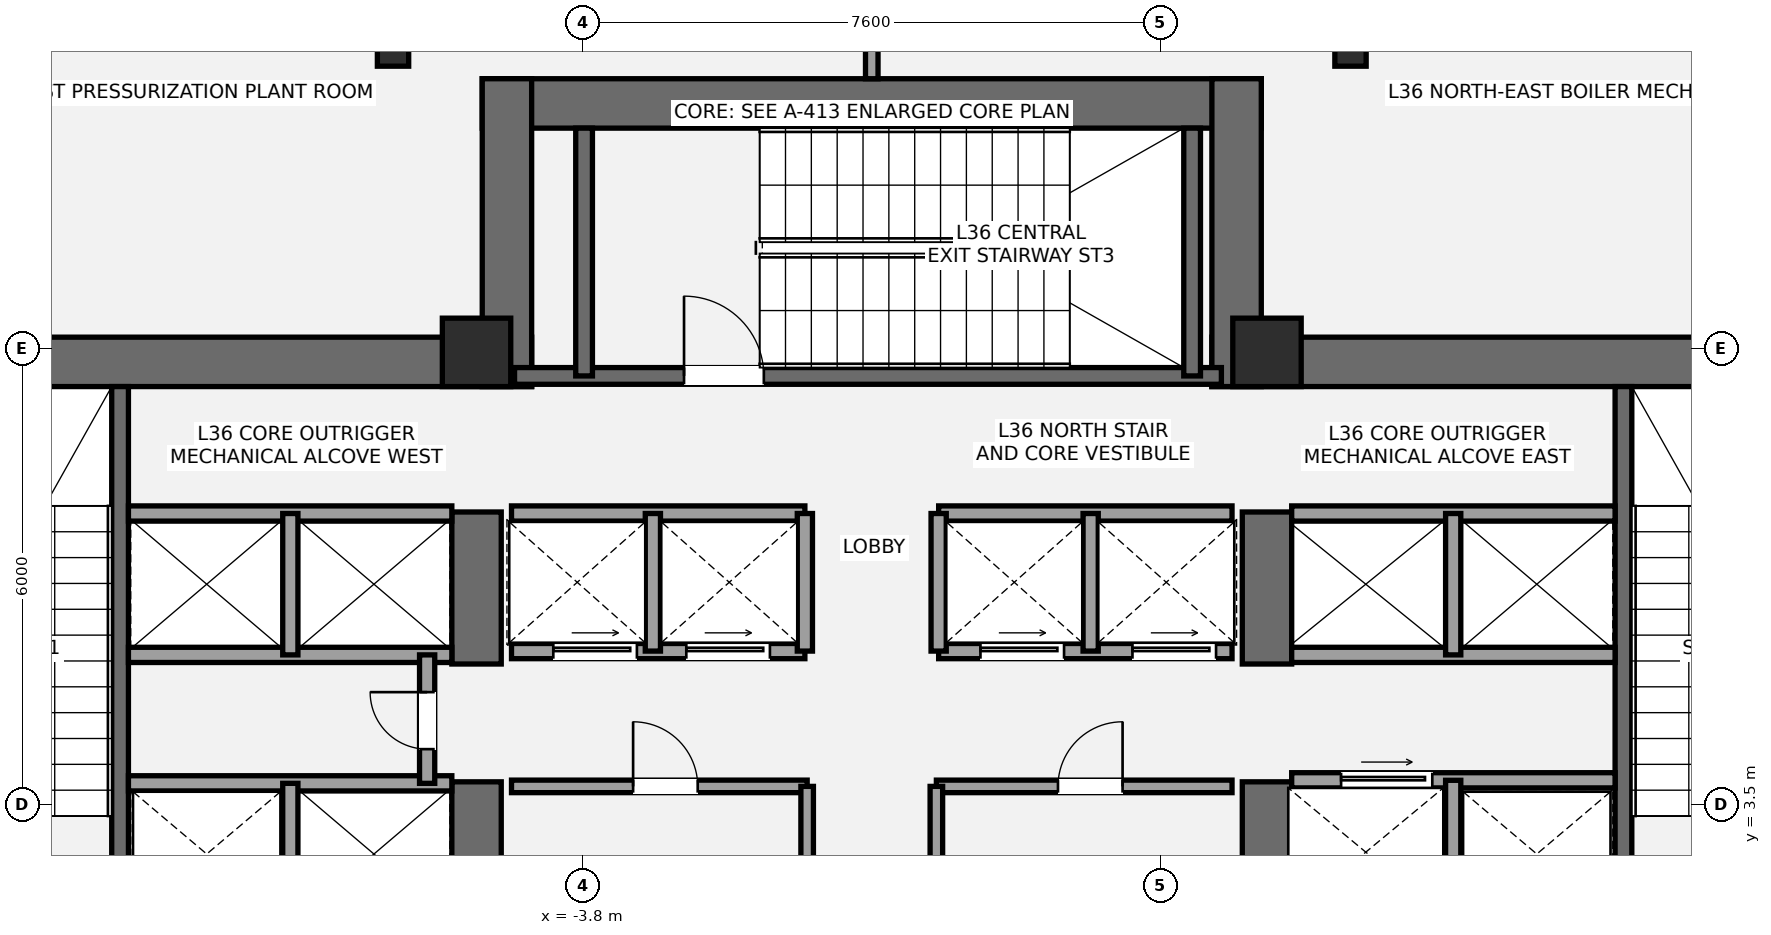
"""IFC4 building model, lengths in metres.
Left out: names, types, materials, properties, quantities, classifications, styles, units other than length and angle.
Written with IfcOpenShell. Run it as: python <this file> out.ifc"""

import sys

from ifc_helpers import new_model, si_unit, direction, frame, frame_2d, origin, origin_2d, place, context, subcontext, project, spatial, rectangle, i_section, extrude, element, fill, save


model = new_model("IFC4")
c1 = context("Model", 3, precision=1e-05, world=origin(), true_north=direction((0.0, 1.0)))
c2 = subcontext(c1, "Body", "Model", "MODEL_VIEW")
j1 = project(units=[si_unit("LENGTHUNIT", "METRE"), si_unit("PLANEANGLEUNIT", "RADIAN")], contexts=[c1])
p1 = place(None, origin())
s1 = spatial("IfcSite", under=j1, at=p1, CompositionType="ELEMENT")
p2 = place(p1, origin())
s2 = spatial("IfcBuilding", under=s1, at=p2, CompositionType="ELEMENT")
p3 = place(p2, frame((0.0, 0.0, 135.1)))
s3 = spatial("IfcBuildingStorey", under=s2, at=p3, CompositionType="ELEMENT", Elevation=135.1)
p4 = place(p3, frame((-13.8, 9.325, 0.0), z_axis=(0.0, 0.0, 1.0), x_axis=(1.0, 0.0, 0.0)))
e1 = element("IfcWall", 1, at=p4, inside=s3, PredefinedType="SHEAR", context=c2, shape_type="SweptSolid", body=[
    extrude(rectangle(XDim=9.325, YDim=0.65, at=frame_2d((4.663, 0.0))), origin(), (0.0, 0.0, 1.0), 4.5),
])
p5 = place(p3, frame((-5.2, 1.2, 0.0), z_axis=(0.0, 0.0, 1.0), x_axis=(0.0, 1.0, 0.0)))
e2 = element("IfcWall", 2, at=p5, inside=s3, PredefinedType="SHEAR", context=c2, shape_type="SweptSolid", body=[
    extrude(rectangle(XDim=2.6, YDim=0.65, at=frame_2d((1.3, 0.0))), origin(), (0.0, 0.0, 1.0), 4.5),
])
p6 = place(p3, frame((-5.2, 5.35, 0.0), z_axis=(0.0, 0.0, 1.0), x_axis=(0.0, 1.0, 0.0)))
e3 = element("IfcWall", 3, at=p6, inside=s3, PredefinedType="SHEAR", context=c2, shape_type="SweptSolid", body=[
    extrude(rectangle(XDim=2.0, YDim=0.65, at=frame_2d((1.0, 0.0))), origin(), (0.0, 0.0, 1.0), 4.5),
])
p7 = place(p3, frame((-9.89, 1.85, 0.0), z_axis=(0.0, 0.0, 1.0), x_axis=(0.0, 1.0, 0.0)))
e4 = element("IfcWall", 4, at=p7, inside=s3, PredefinedType="SHEAR", context=c2, shape_type="SweptSolid", body=[
    extrude(rectangle(XDim=7.15, YDim=0.22, at=frame_2d((3.575, 0.0))), origin(), (0.0, 0.0, 1.0), 4.5),
])
p8 = place(p3, frame((4.475, 9.325, 0.0), z_axis=(0.0, 0.0, 1.0), x_axis=(1.0, 0.0, 0.0)))
e5 = element("IfcWall", 5, at=p8, inside=s3, PredefinedType="SHEAR", context=c2, shape_type="SweptSolid", body=[
    extrude(rectangle(XDim=9.325, YDim=0.65, at=frame_2d((4.663, 0.0))), origin(), (0.0, 0.0, 1.0), 4.5),
])
p9 = place(p3, frame((5.2, 1.2, 0.0), z_axis=(0.0, 0.0, 1.0), x_axis=(0.0, 1.0, 0.0)))
e6 = element("IfcWall", 6, at=p9, inside=s3, PredefinedType="SHEAR", context=c2, shape_type="SweptSolid", body=[
    extrude(rectangle(XDim=2.6, YDim=0.65, at=frame_2d((1.3, 0.0))), origin(), (0.0, 0.0, 1.0), 4.5),
])
p10 = place(p3, frame((5.2, 5.35, 0.0), z_axis=(0.0, 0.0, 1.0), x_axis=(0.0, 1.0, 0.0)))
e7 = element("IfcWall", 7, at=p10, inside=s3, PredefinedType="SHEAR", context=c2, shape_type="SweptSolid", body=[
    extrude(rectangle(XDim=2.0, YDim=0.65, at=frame_2d((1.0, 0.0))), origin(), (0.0, 0.0, 1.0), 4.5),
])
p11 = place(p3, frame((9.89, 1.85, 0.0), z_axis=(0.0, 0.0, 1.0), x_axis=(0.0, 1.0, 0.0)))
e8 = element("IfcWall", 8, at=p11, inside=s3, PredefinedType="SHEAR", context=c2, shape_type="SweptSolid", body=[
    extrude(rectangle(XDim=7.15, YDim=0.22, at=frame_2d((3.575, 0.0))), origin(), (0.0, 0.0, 1.0), 4.5),
])
p12 = place(p3, frame((-5.125, 12.725, 0.0), z_axis=(0.0, 0.0, 1.0), x_axis=(1.0, 0.0, 0.0)))
e9 = element("IfcWall", 9, at=p12, inside=s3, PredefinedType="SHEAR", context=c2, shape_type="SweptSolid", body=[
    extrude(rectangle(XDim=10.25, YDim=0.65, at=frame_2d((5.125, 0.0))), origin(), (0.0, 0.0, 1.0), 4.5),
])
for number, where, z_axis, x_axis in (
    (10, (-4.8, 9.0, 0.0), (0.0, 0.0, 1.0), (0.0, 1.0, 0.0)),
    (11, (4.8, 9.0, 0.0), (0.0, 0.0, 1.0), (0.0, 1.0, 0.0)),
):
    element("IfcWall", number, at=place(p3, frame(where, z_axis=z_axis, x_axis=x_axis)), inside=s3, PredefinedType="SHEAR", context=c2, shape_type="SweptSolid", body=[
        extrude(rectangle(XDim=4.05, YDim=0.65, at=frame_2d((2.025, 0.0))), origin(), (0.0, 0.0, 1.0), 4.5),
    ])
p13 = place(p3, frame((-4.7, 9.14, 0.0), z_axis=(0.0, 0.0, 1.0), x_axis=(1.0, 0.0, 0.0)))
e12 = element("IfcWall", 12, at=p13, inside=s3, PredefinedType="SHEAR", context=c2, shape_type="SweptSolid", body=[
    extrude(rectangle(XDim=9.3, YDim=0.22, at=frame_2d((4.65, 0.0))), origin(), (0.0, 0.0, 1.0), 4.5),
])
p14 = place(p13, frame((2.23, 0.0, 0.0)))
e13 = element("IfcOpeningElement", 13, at=p14, cuts=e12, PredefinedType="OPENING", context=c2, shape_type="SweptSolid", body=[
    extrude(rectangle(XDim=1.05, YDim=2.15, at=frame_2d((0.525, 1.075))), frame((0.0, 0.12, 0.0), z_axis=(0.0, -1.0, 0.0), x_axis=(1.0, 0.0, 0.0)), (0.0, 0.0, 1.0), 0.24),
])
for number, where, z_axis, x_axis in (
    (14, (-3.785, 9.14, 0.0), (0.0, 0.0, 1.0), (0.0, 1.0, 0.0)),
    (15, (4.215, 9.14, 0.0), (0.0, 0.0, 1.0), (0.0, 1.0, 0.0)),
):
    element("IfcWall", number, at=place(p3, frame(where, z_axis=z_axis, x_axis=x_axis)), inside=s3, PredefinedType="SHEAR", context=c2, shape_type="SweptSolid", body=[
        extrude(rectangle(XDim=3.26, YDim=0.22, at=frame_2d((1.63, 0.0))), origin(), (0.0, 0.0, 1.0), 4.5),
    ])
for number, where, z_axis, x_axis in (
    (16, (-5.2, 9.45, 0.0), (0.0, 0.0, 1.0), (1.0, 0.0, 0.0)),
    (17, (5.2, 9.45, 0.0), (0.0, 0.0, 1.0), (1.0, 0.0, 0.0)),
):
    element("IfcColumn", number, at=place(p3, frame(where, z_axis=z_axis, x_axis=x_axis)), inside=s3, PredefinedType="COLUMN", context=c2, shape_type="SweptSolid", body=[
        extrude(rectangle(XDim=0.9, YDim=0.9, at=origin_2d()), origin(), (0.0, 0.0, 1.0), 4.5),
    ])
for number, where, z_axis, x_axis in (
    (18, (6.299, 13.433, 0.0), (0.0, 0.0, 1.0), (1.0, 0.0, 0.0)),
    (19, (-6.299, 13.433, 0.0), (0.0, 0.0, 1.0), (1.0, 0.0, 0.0)),
):
    element("IfcColumn", number, at=place(p3, frame(where, z_axis=z_axis, x_axis=x_axis)), inside=s3, PredefinedType="COLUMN", context=c2, shape_type="SweptSolid", body=[
        extrude(i_section(OverallWidth=0.412, OverallDepth=0.435, WebThickness=0.036, FlangeThickness=0.057, at=origin_2d()), origin(), (0.0, 0.0, 1.0), 4.5),
    ])
p15 = place(p3, frame((-9.78, 3.78, 0.0), z_axis=(0.0, 0.0, 1.0), x_axis=(1.0, 0.0, 0.0)))
e20 = element("IfcWall", 20, at=p15, inside=s3, PredefinedType="SOLIDWALL", context=c2, shape_type="SweptSolid", body=[
    extrude(rectangle(XDim=4.255, YDim=0.2, at=frame_2d((2.127, 0.0))), origin(), (0.0, 0.0, 1.0), 4.28),
])
p16 = place(p3, frame((-7.65, 1.85, 0.0), z_axis=(0.0, 0.0, 1.0), x_axis=(0.0, 1.0, 0.0)))
e21 = element("IfcWall", 21, at=p16, inside=s3, PredefinedType="SOLIDWALL", context=c2, shape_type="SweptSolid", body=[
    extrude(rectangle(XDim=1.93, YDim=0.2, at=frame_2d((0.965, 0.0))), origin(), (0.0, 0.0, 1.0), 4.28),
])
for number, where, z_axis, x_axis in (
    (22, (-9.78, 5.47, 0.0), (0.0, 0.0, 1.0), (1.0, 0.0, 0.0)),
    (23, (-9.78, 7.33, 0.0), (0.0, 0.0, 1.0), (1.0, 0.0, 0.0)),
):
    element("IfcWall", number, at=place(p3, frame(where, z_axis=z_axis, x_axis=x_axis)), inside=s3, PredefinedType="SOLIDWALL", context=c2, shape_type="SweptSolid", body=[
        extrude(rectangle(XDim=4.255, YDim=0.2, at=frame_2d((2.127, 0.0))), origin(), (0.0, 0.0, 1.0), 4.28),
    ])
p17 = place(p3, frame((-7.65, 5.47, 0.0), z_axis=(0.0, 0.0, 1.0), x_axis=(0.0, 1.0, 0.0)))
e24 = element("IfcWall", 24, at=p17, inside=s3, PredefinedType="SOLIDWALL", context=c2, shape_type="SweptSolid", body=[
    extrude(rectangle(XDim=1.86, YDim=0.2, at=frame_2d((0.93, 0.0))), origin(), (0.0, 0.0, 1.0), 4.28),
])
p18 = place(p3, frame((-5.85, 3.78, 0.0), z_axis=(0.0, 0.0, 1.0), x_axis=(0.0, 1.0, 0.0)))
e25 = element("IfcWall", 25, at=p18, inside=s3, PredefinedType="SOLIDWALL", context=c2, shape_type="SweptSolid", body=[
    extrude(rectangle(XDim=1.69, YDim=0.2, at=frame_2d((0.845, 0.0))), origin(), (0.0, 0.0, 1.0), 4.28),
])
p19 = place(p18, frame((0.45, 0.0, 0.0)))
e26 = element("IfcOpeningElement", 26, at=p19, cuts=e25, PredefinedType="OPENING", context=c2, shape_type="SweptSolid", body=[
    extrude(rectangle(XDim=0.75, YDim=2.1, at=frame_2d((0.375, 1.05))), frame((0.0, 0.11, 0.0), z_axis=(0.0, -1.0, 0.0), x_axis=(1.0, 0.0, 0.0)), (0.0, 0.0, 1.0), 0.22),
])
p20 = place(p3, frame((5.525, 3.82, 0.0), z_axis=(0.0, 0.0, 1.0), x_axis=(1.0, 0.0, 0.0)))
e27 = element("IfcWall", 27, at=p20, inside=s3, PredefinedType="SOLIDWALL", context=c2, shape_type="SweptSolid", body=[
    extrude(rectangle(XDim=4.255, YDim=0.2, at=frame_2d((2.127, 0.0))), origin(), (0.0, 0.0, 1.0), 4.28),
])
p21 = place(p20, frame((0.65, 0.0, 0.0)))
e28 = element("IfcOpeningElement", 28, at=p21, cuts=e27, PredefinedType="OPENING", context=c2, shape_type="SweptSolid", body=[
    extrude(rectangle(XDim=1.2, YDim=2.2, at=frame_2d((0.6, 1.1))), frame((0.0, 0.11, 0.0), z_axis=(0.0, -1.0, 0.0), x_axis=(1.0, 0.0, 0.0)), (0.0, 0.0, 1.0), 0.22),
])
p22 = place(p3, frame((7.65, 1.85, 0.0), z_axis=(0.0, 0.0, 1.0), x_axis=(0.0, 1.0, 0.0)))
e29 = element("IfcWall", 29, at=p22, inside=s3, PredefinedType="SOLIDWALL", context=c2, shape_type="SweptSolid", body=[
    extrude(rectangle(XDim=1.97, YDim=0.2, at=frame_2d((0.985, 0.0))), origin(), (0.0, 0.0, 1.0), 4.28),
])
for number, where, z_axis, x_axis in (
    (30, (5.525, 5.47, 0.0), (0.0, 0.0, 1.0), (1.0, 0.0, 0.0)),
    (31, (5.525, 7.33, 0.0), (0.0, 0.0, 1.0), (1.0, 0.0, 0.0)),
):
    element("IfcWall", number, at=place(p3, frame(where, z_axis=z_axis, x_axis=x_axis)), inside=s3, PredefinedType="SOLIDWALL", context=c2, shape_type="SweptSolid", body=[
        extrude(rectangle(XDim=4.255, YDim=0.2, at=frame_2d((2.127, 0.0))), origin(), (0.0, 0.0, 1.0), 4.28),
    ])
p23 = place(p3, frame((7.65, 5.47, 0.0), z_axis=(0.0, 0.0, 1.0), x_axis=(0.0, 1.0, 0.0)))
e32 = element("IfcWall", 32, at=p23, inside=s3, PredefinedType="SOLIDWALL", context=c2, shape_type="SweptSolid", body=[
    extrude(rectangle(XDim=1.86, YDim=0.2, at=frame_2d((0.93, 0.0))), origin(), (0.0, 0.0, 1.0), 4.28),
])
p24 = place(p3, frame((-4.74, 3.74, 0.0), z_axis=(0.0, 0.0, 1.0), x_axis=(1.0, 0.0, 0.0)))
e33 = element("IfcWall", 33, at=p24, inside=s3, PredefinedType="PARTITIONING", context=c2, shape_type="SweptSolid", body=[
    extrude(rectangle(XDim=3.89, YDim=0.165, at=frame_2d((1.945, 0.0))), origin(), (0.0, 0.0, 1.0), 4.28),
])
p25 = place(p24, frame((1.6, 0.0, 0.0)))
e34 = element("IfcOpeningElement", 34, at=p25, cuts=e33, PredefinedType="OPENING", context=c2, shape_type="SweptSolid", body=[
    extrude(rectangle(XDim=0.85, YDim=2.1, at=frame_2d((0.425, 1.05))), frame((0.0, 0.093, 0.0), z_axis=(0.0, -1.0, 0.0), x_axis=(1.0, 0.0, 0.0)), (0.0, 0.0, 1.0), 0.185),
])
p26 = place(p3, frame((-0.85, 1.92, 0.0), z_axis=(0.0, 0.0, 1.0), x_axis=(0.0, 1.0, 0.0)))
e35 = element("IfcWall", 35, at=p26, inside=s3, PredefinedType="PARTITIONING", context=c2, shape_type="SweptSolid", body=[
    extrude(rectangle(XDim=1.82, YDim=0.165, at=frame_2d((0.91, 0.0))), origin(), (0.0, 0.0, 1.0), 4.28),
])
p27 = place(p3, frame((0.85, 3.74, 0.0), z_axis=(0.0, 0.0, 1.0), x_axis=(1.0, 0.0, 0.0)))
e36 = element("IfcWall", 36, at=p27, inside=s3, PredefinedType="PARTITIONING", context=c2, shape_type="SweptSolid", body=[
    extrude(rectangle(XDim=3.89, YDim=0.165, at=frame_2d((1.945, 0.0))), origin(), (0.0, 0.0, 1.0), 4.28),
])
p28 = place(p27, frame((1.6, 0.0, 0.0)))
e37 = element("IfcOpeningElement", 37, at=p28, cuts=e36, PredefinedType="OPENING", context=c2, shape_type="SweptSolid", body=[
    extrude(rectangle(XDim=0.85, YDim=2.1, at=frame_2d((0.425, 1.05))), frame((0.0, 0.093, 0.0), z_axis=(0.0, -1.0, 0.0), x_axis=(1.0, 0.0, 0.0)), (0.0, 0.0, 1.0), 0.185),
])
p29 = place(p3, frame((0.85, 1.92, 0.0), z_axis=(0.0, 0.0, 1.0), x_axis=(0.0, 1.0, 0.0)))
e38 = element("IfcWall", 38, at=p29, inside=s3, PredefinedType="PARTITIONING", context=c2, shape_type="SweptSolid", body=[
    extrude(rectangle(XDim=1.82, YDim=0.165, at=frame_2d((0.91, 0.0))), origin(), (0.0, 0.0, 1.0), 4.28),
])
p30 = place(p3, frame((-4.74, 5.52, 0.0), z_axis=(0.0, 0.0, 1.0), x_axis=(1.0, 0.0, 0.0)))
e39 = element("IfcWall", 39, at=p30, inside=s3, PredefinedType="SOLIDWALL", context=c2, shape_type="SweptSolid", body=[
    extrude(rectangle(XDim=3.86, YDim=0.2, at=frame_2d((1.93, 0.0))), origin(), (0.0, 0.0, 1.0), 4.28),
])
p31 = place(p30, frame((0.55, 0.0, 0.0)))
e40 = element("IfcOpeningElement", 40, at=p31, cuts=e39, PredefinedType="OPENING", context=c2, shape_type="SweptSolid", body=[
    extrude(rectangle(XDim=1.1, YDim=2.2, at=frame_2d((0.55, 1.1))), frame((0.0, 0.11, 0.0), z_axis=(0.0, -1.0, 0.0), x_axis=(1.0, 0.0, 0.0)), (0.0, 0.0, 1.0), 0.22),
])
p32 = place(p30, frame((2.3, 0.0, 0.0)))
e41 = element("IfcOpeningElement", 41, at=p32, cuts=e39, PredefinedType="OPENING", context=c2, shape_type="SweptSolid", body=[
    extrude(rectangle(XDim=1.1, YDim=2.2, at=frame_2d((0.55, 1.1))), frame((0.0, 0.11, 0.0), z_axis=(0.0, -1.0, 0.0), x_axis=(1.0, 0.0, 0.0)), (0.0, 0.0, 1.0), 0.22),
])
p33 = place(p3, frame((0.88, 5.52, 0.0), z_axis=(0.0, 0.0, 1.0), x_axis=(1.0, 0.0, 0.0)))
e42 = element("IfcWall", 42, at=p33, inside=s3, PredefinedType="SOLIDWALL", context=c2, shape_type="SweptSolid", body=[
    extrude(rectangle(XDim=3.86, YDim=0.2, at=frame_2d((1.93, 0.0))), origin(), (0.0, 0.0, 1.0), 4.28),
])
p34 = place(p33, frame((0.55, 0.0, 0.0)))
e43 = element("IfcOpeningElement", 43, at=p34, cuts=e42, PredefinedType="OPENING", context=c2, shape_type="SweptSolid", body=[
    extrude(rectangle(XDim=1.1, YDim=2.2, at=frame_2d((0.55, 1.1))), frame((0.0, 0.11, 0.0), z_axis=(0.0, -1.0, 0.0), x_axis=(1.0, 0.0, 0.0)), (0.0, 0.0, 1.0), 0.22),
])
p35 = place(p33, frame((2.55, 0.0, 0.0)))
e44 = element("IfcOpeningElement", 44, at=p35, cuts=e42, PredefinedType="OPENING", context=c2, shape_type="SweptSolid", body=[
    extrude(rectangle(XDim=1.1, YDim=2.2, at=frame_2d((0.55, 1.1))), frame((0.0, 0.11, 0.0), z_axis=(0.0, -1.0, 0.0), x_axis=(1.0, 0.0, 0.0)), (0.0, 0.0, 1.0), 0.22),
])
for number, where, z_axis, x_axis in (
    (45, (-4.74, 7.33, 0.0), (0.0, 0.0, 1.0), (1.0, 0.0, 0.0)),
    (46, (0.88, 7.33, 0.0), (0.0, 0.0, 1.0), (1.0, 0.0, 0.0)),
):
    element("IfcWall", number, at=place(p3, frame(where, z_axis=z_axis, x_axis=x_axis)), inside=s3, PredefinedType="SOLIDWALL", context=c2, shape_type="SweptSolid", body=[
        extrude(rectangle(XDim=3.86, YDim=0.2, at=frame_2d((1.93, 0.0))), origin(), (0.0, 0.0, 1.0), 4.28),
    ])
for number, where, z_axis, x_axis in (
    (47, (-2.88, 5.52, 0.0), (0.0, 0.0, 1.0), (0.0, 1.0, 0.0)),
    (48, (2.88, 5.52, 0.0), (0.0, 0.0, 1.0), (0.0, 1.0, 0.0)),
    (49, (-0.88, 5.52, 0.0), (0.0, 0.0, 1.0), (0.0, 1.0, 0.0)),
    (50, (0.88, 5.52, 0.0), (0.0, 0.0, 1.0), (0.0, 1.0, 0.0)),
):
    element("IfcWall", number, at=place(p3, frame(where, z_axis=z_axis, x_axis=x_axis)), inside=s3, PredefinedType="SOLIDWALL", context=c2, shape_type="SweptSolid", body=[
        extrude(rectangle(XDim=1.81, YDim=0.2, at=frame_2d((0.905, 0.0))), origin(), (0.0, 0.0, 1.0), 4.28),
    ])
p36 = place(p3, frame((0.0, 13.05, 0.0), z_axis=(0.0, 0.0, 1.0), x_axis=(0.0, 1.0, 0.0)))
e51 = element("IfcWall", 51, at=p36, inside=s3, PredefinedType="PARTITIONING", context=c2, shape_type="SweptSolid", body=[
    extrude(rectangle(XDim=4.037, YDim=0.165, at=frame_2d((2.019, 0.0))), origin(), (0.0, 0.0, 1.0), 4.28),
])
p37 = place(p14, origin())
e52 = element("IfcDoor", 52, at=p37, inside=s3, OperationType="SINGLE_SWING_LEFT", PredefinedType="DOOR", context=c2, shape_type="SweptSolid", body=[
    extrude(rectangle(XDim=1.05, YDim=2.15, at=frame_2d((0.525, 1.075))), frame((0.0, 0.025, 0.0), z_axis=(0.0, -1.0, 0.0), x_axis=(1.0, 0.0, 0.0)), (0.0, 0.0, 1.0), 0.05),
])
fill(e13, e52)
p38 = place(p19, origin())
e53 = element("IfcDoor", 53, at=p38, inside=s3, OperationType="SINGLE_SWING_RIGHT", PredefinedType="DOOR", context=c2, shape_type="SweptSolid", body=[
    extrude(rectangle(XDim=0.75, YDim=2.1, at=frame_2d((0.375, 1.05))), frame((0.0, 0.025, 0.0), z_axis=(0.0, -1.0, 0.0), x_axis=(1.0, 0.0, 0.0)), (0.0, 0.0, 1.0), 0.05),
])
fill(e26, e53)
p39 = place(p21, origin())
e54 = element("IfcDoor", 54, at=p39, inside=s3, OperationType="SLIDING_TO_RIGHT", PredefinedType="DOOR", context=c2, shape_type="SweptSolid", body=[
    extrude(rectangle(XDim=1.2, YDim=2.2, at=frame_2d((0.6, 1.1))), frame((0.0, 0.025, 0.0), z_axis=(0.0, -1.0, 0.0), x_axis=(1.0, 0.0, 0.0)), (0.0, 0.0, 1.0), 0.05),
])
fill(e28, e54)
p40 = place(p25, origin())
e55 = element("IfcDoor", 55, at=p40, inside=s3, OperationType="SINGLE_SWING_LEFT", PredefinedType="DOOR", context=c2, shape_type="SweptSolid", body=[
    extrude(rectangle(XDim=0.85, YDim=2.1, at=frame_2d((0.425, 1.05))), frame((0.0, 0.025, 0.0), z_axis=(0.0, -1.0, 0.0), x_axis=(1.0, 0.0, 0.0)), (0.0, 0.0, 1.0), 0.05),
])
fill(e34, e55)
p41 = place(p28, origin())
e56 = element("IfcDoor", 56, at=p41, inside=s3, OperationType="SINGLE_SWING_RIGHT", PredefinedType="DOOR", context=c2, shape_type="SweptSolid", body=[
    extrude(rectangle(XDim=0.85, YDim=2.1, at=frame_2d((0.425, 1.05))), frame((0.0, 0.025, 0.0), z_axis=(0.0, -1.0, 0.0), x_axis=(1.0, 0.0, 0.0)), (0.0, 0.0, 1.0), 0.05),
])
fill(e37, e56)
p42 = place(p31, origin())
e57 = element("IfcDoor", 57, at=p42, inside=s3, OperationType="SLIDING_TO_LEFT", PredefinedType="DOOR", context=c2, shape_type="SweptSolid", body=[
    extrude(rectangle(XDim=1.1, YDim=2.2, at=frame_2d((0.55, 1.1))), frame((0.0, 0.025, 0.0), z_axis=(0.0, -1.0, 0.0), x_axis=(1.0, 0.0, 0.0)), (0.0, 0.0, 1.0), 0.05),
])
fill(e40, e57)
p43 = place(p32, origin())
e58 = element("IfcDoor", 58, at=p43, inside=s3, OperationType="SLIDING_TO_LEFT", PredefinedType="DOOR", context=c2, shape_type="SweptSolid", body=[
    extrude(rectangle(XDim=1.1, YDim=2.2, at=frame_2d((0.55, 1.1))), frame((0.0, 0.025, 0.0), z_axis=(0.0, -1.0, 0.0), x_axis=(1.0, 0.0, 0.0)), (0.0, 0.0, 1.0), 0.05),
])
fill(e41, e58)
p44 = place(p34, origin())
e59 = element("IfcDoor", 59, at=p44, inside=s3, OperationType="SLIDING_TO_LEFT", PredefinedType="DOOR", context=c2, shape_type="SweptSolid", body=[
    extrude(rectangle(XDim=1.1, YDim=2.2, at=frame_2d((0.55, 1.1))), frame((0.0, 0.025, 0.0), z_axis=(0.0, -1.0, 0.0), x_axis=(1.0, 0.0, 0.0)), (0.0, 0.0, 1.0), 0.05),
])
fill(e43, e59)
p45 = place(p35, origin())
e60 = element("IfcDoor", 60, at=p45, inside=s3, OperationType="SLIDING_TO_LEFT", PredefinedType="DOOR", context=c2, shape_type="SweptSolid", body=[
    extrude(rectangle(XDim=1.1, YDim=2.2, at=frame_2d((0.55, 1.1))), frame((0.0, 0.025, 0.0), z_axis=(0.0, -1.0, 0.0), x_axis=(1.0, 0.0, 0.0)), (0.0, 0.0, 1.0), 0.05),
])
fill(e44, e60)
save(model, sys.argv[1])
